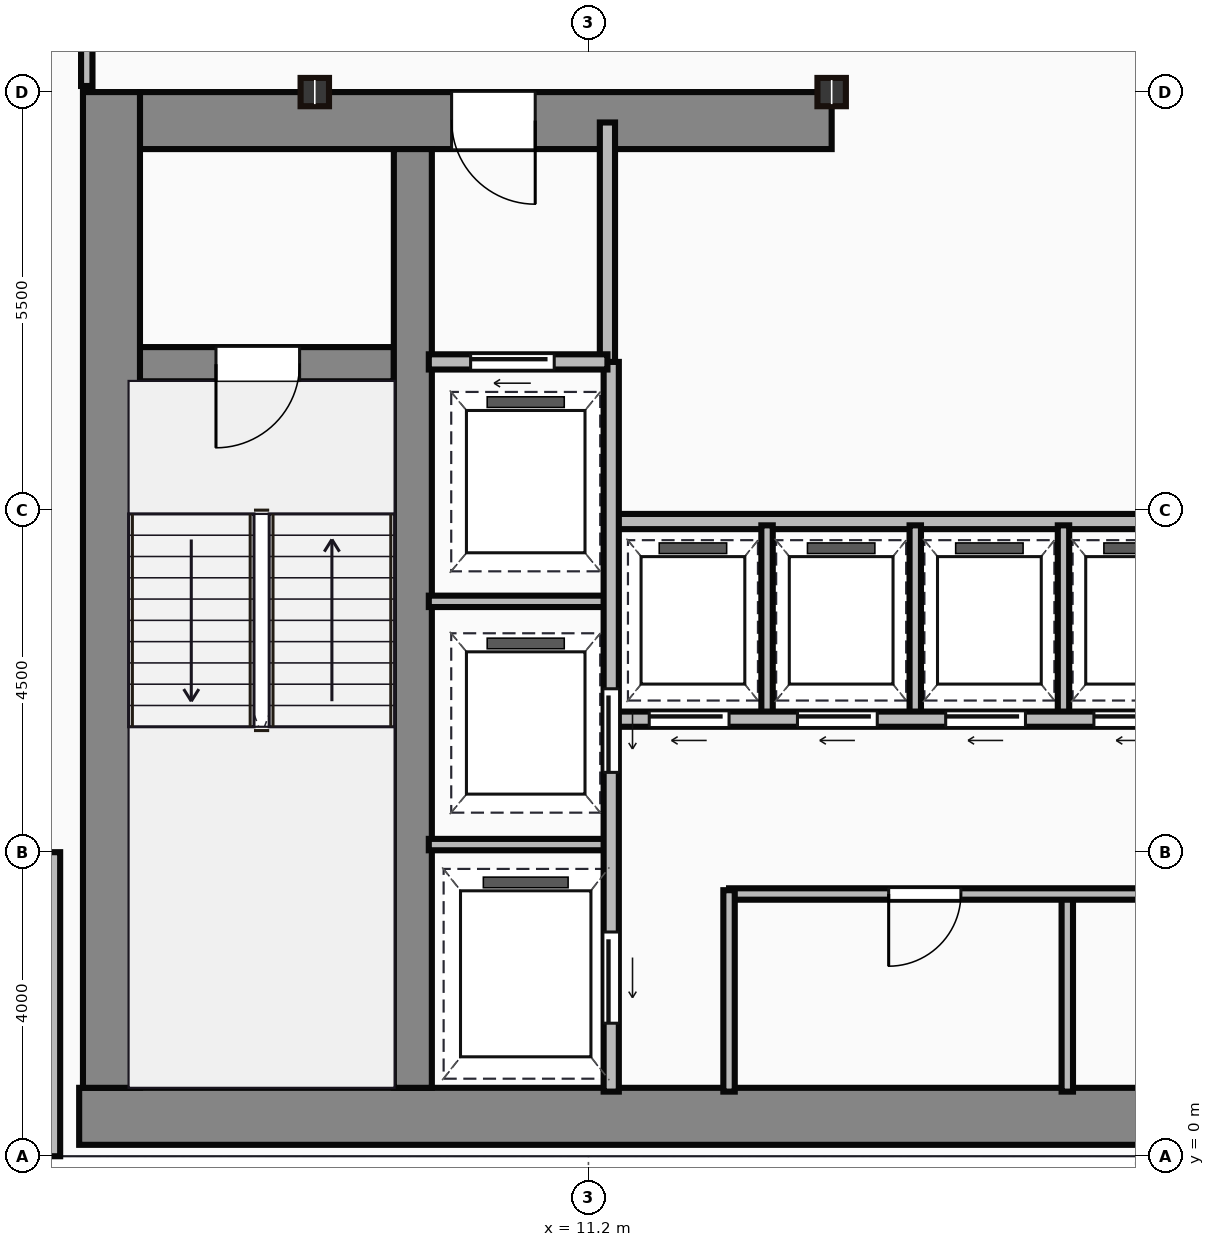
"""IFC4 building model, lengths in metres.
Left out: names, types, materials, properties, quantities, classifications, styles, units other than length and angle.
Written with IfcOpenShell. Run it as: python <this file> out.ifc"""

import sys

from ifc_helpers import new_model, si_unit, direction, frame, frame_2d, origin, origin_2d, place, context, subcontext, project, spatial, rectangle, i_section, extrude, source, transform, mapped, element, fill, save


model = new_model("IFC4")
c1 = context("Model", 3, precision=1e-05, world=origin(), true_north=direction((0.0, 1.0)))
c2 = subcontext(c1, "Body", "Model", "MODEL_VIEW")
j1 = project(units=[si_unit("LENGTHUNIT", "METRE"), si_unit("PLANEANGLEUNIT", "RADIAN")], contexts=[c1])
p1 = place(None, origin())
s1 = spatial("IfcSite", under=j1, at=p1, CompositionType="ELEMENT")
p2 = place(p1, origin())
s2 = spatial("IfcBuilding", under=s1, at=p2, CompositionType="ELEMENT")
p3 = place(p2, frame((0.0, 0.0, 158.85)))
s3 = spatial("IfcBuildingStorey", under=s2, at=p3, CompositionType="ELEMENT", Elevation=158.85)
m1 = source(origin(), c2, "Body", "SweptSolid", [
    extrude(rectangle(XDim=29.5, YDim=0.75, at=frame_2d((14.75, 0.0))), origin(), (0.0, 0.0, 1.0), 3.65),
])
p4 = place(p3, frame((4.5, 0.525, 0.0), z_axis=(0.0, 0.0, 1.0), x_axis=(1.0, 0.0, 0.0)))
e1 = element("IfcWall", 1, at=p4, inside=s3, PredefinedType="SHEAR", context=c2, shape_type="MappedRepresentation", body=[
    mapped(m1, transform((0.0, 0.0, 0.0))),
])
m2 = source(origin(), c2, "Body", "SweptSolid", [
    extrude(rectangle(XDim=13.1, YDim=0.75, at=frame_2d((6.55, 0.0))), origin(), (0.0, 0.0, 1.0), 3.65),
])
p5 = place(p3, frame((4.925, 0.9, 0.0), z_axis=(0.0, 0.0, 1.0), x_axis=(0.0, 1.0, 0.0)))
e2 = element("IfcWall", 2, at=p5, inside=s3, PredefinedType="SHEAR", context=c2, shape_type="MappedRepresentation", body=[
    mapped(m2, transform((0.0, 0.0, 0.0))),
])
m3 = source(origin(), c2, "Body", "SweptSolid", [
    extrude(rectangle(XDim=9.1, YDim=0.75, at=frame_2d((4.55, 0.0))), origin(), (0.0, 0.0, 1.0), 3.65),
])
p6 = place(p3, frame((5.3, 13.625, 0.0), z_axis=(0.0, 0.0, 1.0), x_axis=(1.0, 0.0, 0.0)))
e3 = element("IfcWall", 3, at=p6, inside=s3, PredefinedType="SHEAR", context=c2, shape_type="MappedRepresentation", body=[
    mapped(m3, transform((0.0, 0.0, 0.0))),
])
p7 = place(p6, frame((4.1, 0.0, 0.0)))
e4 = element("IfcOpeningElement", 4, at=p7, cuts=e3, PredefinedType="OPENING", context=c2, shape_type="SweptSolid", body=[
    extrude(rectangle(XDim=1.1, YDim=2.15, at=frame_2d((0.55, 1.075))), frame((0.0, 0.385, 0.0), z_axis=(0.0, -1.0, 0.0), x_axis=(1.0, 0.0, 0.0)), (0.0, 0.0, 1.0), 0.77),
])
m4 = source(origin(), c2, "Body", "SweptSolid", [
    extrude(rectangle(XDim=12.35, YDim=0.5, at=frame_2d((6.175, 0.0))), origin(), (0.0, 0.0, 1.0), 3.65),
])
p8 = place(p3, frame((8.89, 0.9, 0.0), z_axis=(0.0, 0.0, 1.0), x_axis=(0.0, 1.0, 0.0)))
e5 = element("IfcWall", 5, at=p8, inside=s3, PredefinedType="SHEAR", context=c2, shape_type="MappedRepresentation", body=[
    mapped(m4, transform((0.0, 0.0, 0.0))),
])
m5 = source(origin(), c2, "Body", "SweptSolid", [
    extrude(rectangle(XDim=3.39, YDim=0.45, at=frame_2d((1.695, 0.0))), origin(), (0.0, 0.0, 1.0), 3.65),
])
p9 = place(p3, frame((5.25, 10.42, 0.0), z_axis=(0.0, 0.0, 1.0), x_axis=(1.0, 0.0, 0.0)))
e6 = element("IfcWall", 6, at=p9, inside=s3, PredefinedType="SHEAR", context=c2, shape_type="MappedRepresentation", body=[
    mapped(m5, transform((0.0, 0.0, 0.0))),
])
p10 = place(p9, frame((1.05, 0.0, 0.0)))
e7 = element("IfcOpeningElement", 7, at=p10, cuts=e6, PredefinedType="OPENING", context=c2, shape_type="SweptSolid", body=[
    extrude(rectangle(XDim=1.1, YDim=2.15, at=frame_2d((0.55, 1.075))), frame((0.0, 0.235, 0.0), z_axis=(0.0, -1.0, 0.0), x_axis=(1.0, 0.0, 0.0)), (0.0, 0.0, 1.0), 0.47),
])
m6 = source(origin(), c2, "Body", "SweptSolid", [
    extrude(i_section(OverallWidth=0.374, OverallDepth=0.372, WebThickness=0.016, FlangeThickness=0.026, at=origin_2d()), origin(), (0.0, 0.0, 1.0), 3.65),
])
for number, where, z_axis, x_axis in (
    (8, (7.6, 14.0, 0.0), (0.0, 0.0, 1.0), (1.0, 0.0, 0.0)),
    (9, (14.4, 14.0, 0.0), (0.0, 0.0, 1.0), (1.0, 0.0, 0.0)),
):
    element("IfcColumn", number, at=place(p3, frame(where, z_axis=z_axis, x_axis=x_axis)), inside=s3, PredefinedType="COLUMN", context=c2, shape_type="MappedRepresentation", body=[
        mapped(m6, transform((0.0, 0.0, 0.0))),
    ])
m7 = source(origin(), c2, "Body", "SweptSolid", [
    extrude(rectangle(XDim=4.0, YDim=0.25, at=frame_2d((2.0, 0.0))), origin(), (0.0, 0.0, 1.0), 3.4),
])
p11 = place(p3, frame((4.125, 4.0, 0.0), z_axis=(0.0, 0.0, 1.0), x_axis=(0.0, -1.0, 0.0)))
e10 = element("IfcWall", 10, at=p11, inside=s3, PredefinedType="STANDARD", context=c2, shape_type="MappedRepresentation", body=[
    mapped(m7, transform((0.0, 0.0, 0.0))),
])
m8 = source(origin(), c2, "Body", "SweptSolid", [
    extrude(rectangle(XDim=3.18, YDim=0.2, at=frame_2d((1.59, 0.0))), origin(), (0.0, 0.0, 1.0), 3.4),
])
p12 = place(p3, frame((11.45, 10.42, 0.0), z_axis=(0.0, 0.0, 1.0), x_axis=(0.0, 1.0, 0.0)))
e11 = element("IfcWall", 11, at=p12, inside=s3, PredefinedType="PARTITIONING", context=c2, shape_type="MappedRepresentation", body=[
    mapped(m8, transform((0.0, 0.0, 0.0))),
])
m9 = source(origin(), c2, "Body", "SweptSolid", [
    extrude(rectangle(XDim=2.35, YDim=0.2, at=frame_2d((1.175, 0.0))), origin(), (0.0, 0.0, 1.0), 3.4),
])
p13 = place(p3, frame((9.1, 10.45, 0.0), z_axis=(0.0, 0.0, 1.0), x_axis=(1.0, 0.0, 0.0)))
e12 = element("IfcWall", 12, at=p13, inside=s3, PredefinedType="PARTITIONING", context=c2, shape_type="MappedRepresentation", body=[
    mapped(m9, transform((0.0, 0.0, 0.0))),
])
p14 = place(p13, frame((0.55, 0.0, 0.0)))
e13 = element("IfcOpeningElement", 13, at=p14, cuts=e12, PredefinedType="OPENING", context=c2, shape_type="SweptSolid", body=[
    extrude(rectangle(XDim=1.1, YDim=2.15, at=frame_2d((0.55, 1.075))), frame((0.0, 0.11, 0.0), z_axis=(0.0, -1.0, 0.0), x_axis=(1.0, 0.0, 0.0)), (0.0, 0.0, 1.0), 0.22),
])
m10 = source(origin(), c2, "Body", "SweptSolid", [
    extrude(rectangle(XDim=9.6, YDim=0.2, at=frame_2d((4.8, 0.0))), origin(), (0.0, 0.0, 1.0), 3.4),
])
p15 = place(p3, frame((11.5, 0.85, 0.0), z_axis=(0.0, 0.0, 1.0), x_axis=(0.0, 1.0, 0.0)))
e14 = element("IfcWall", 14, at=p15, inside=s3, PredefinedType="PARTITIONING", context=c2, shape_type="MappedRepresentation", body=[
    mapped(m10, transform((0.0, 0.0, 0.0))),
])
p16 = place(p15, frame((4.2, 0.0, 0.0)))
e15 = element("IfcOpeningElement", 15, at=p16, cuts=e14, PredefinedType="OPENING", context=c2, shape_type="SweptSolid", body=[
    extrude(rectangle(XDim=1.1, YDim=2.15, at=frame_2d((0.55, 1.075))), frame((0.0, 0.11, 0.0), z_axis=(0.0, -1.0, 0.0), x_axis=(1.0, 0.0, 0.0)), (0.0, 0.0, 1.0), 0.22),
])
p17 = place(p15, frame((0.9, 0.0, 0.0)))
e16 = element("IfcOpeningElement", 16, at=p17, cuts=e14, PredefinedType="OPENING", context=c2, shape_type="SweptSolid", body=[
    extrude(rectangle(XDim=1.2, YDim=2.15, at=frame_2d((0.6, 1.075))), frame((0.0, 0.11, 0.0), z_axis=(0.0, -1.0, 0.0), x_axis=(1.0, 0.0, 0.0)), (0.0, 0.0, 1.0), 0.22),
])
m11 = source(origin(), c2, "Body", "SweptSolid", [
    extrude(rectangle(XDim=2.4, YDim=0.15, at=frame_2d((1.2, 0.0))), origin(), (0.0, 0.0, 1.0), 3.4),
])
for number, where, z_axis, x_axis in (
    (17, (9.1, 4.1, 0.0), (0.0, 0.0, 1.0), (1.0, 0.0, 0.0)),
    (18, (9.1, 7.3, 0.0), (0.0, 0.0, 1.0), (1.0, 0.0, 0.0)),
):
    element("IfcWall", number, at=place(p3, frame(where, z_axis=z_axis, x_axis=x_axis)), inside=s3, PredefinedType="PARTITIONING", context=c2, shape_type="MappedRepresentation", body=[
        mapped(m11, transform((0.0, 0.0, 0.0))),
    ])
m12 = source(origin(), c2, "Body", "SweptSolid", [
    extrude(rectangle(XDim=2.65, YDim=0.15, at=frame_2d((1.325, 0.0))), origin(), (0.0, 0.0, 1.0), 3.4),
])
p18 = place(p3, frame((13.05, 0.85, 0.0), z_axis=(0.0, 0.0, 1.0), x_axis=(0.0, 1.0, 0.0)))
e19 = element("IfcWall", 19, at=p18, inside=s3, PredefinedType="PARTITIONING", context=c2, shape_type="MappedRepresentation", body=[
    mapped(m12, transform((0.0, 0.0, 0.0))),
])
m13 = source(origin(), c2, "Body", "SweptSolid", [
    extrude(rectangle(XDim=10.35, YDim=0.15, at=frame_2d((5.175, 0.0))), origin(), (0.0, 0.0, 1.0), 3.4),
])
p19 = place(p3, frame((13.05, 3.45, 0.0), z_axis=(0.0, 0.0, 1.0), x_axis=(1.0, 0.0, 0.0)))
e20 = element("IfcWall", 20, at=p19, inside=s3, PredefinedType="PARTITIONING", context=c2, shape_type="MappedRepresentation", body=[
    mapped(m13, transform((0.0, 0.0, 0.0))),
])
p20 = place(p19, frame((2.1, 0.0, 0.0)))
e21 = element("IfcOpeningElement", 21, at=p20, cuts=e20, PredefinedType="OPENING", context=c2, shape_type="SweptSolid", body=[
    extrude(rectangle(XDim=0.95, YDim=2.15, at=frame_2d((0.475, 1.075))), frame((0.0, 0.085, 0.0), z_axis=(0.0, -1.0, 0.0), x_axis=(1.0, 0.0, 0.0)), (0.0, 0.0, 1.0), 0.17),
])
p21 = place(p19, frame((6.8, 0.0, 0.0)))
e22 = element("IfcOpeningElement", 22, at=p21, cuts=e20, PredefinedType="OPENING", context=c2, shape_type="SweptSolid", body=[
    extrude(rectangle(XDim=0.95, YDim=2.15, at=frame_2d((0.475, 1.075))), frame((0.0, 0.085, 0.0), z_axis=(0.0, -1.0, 0.0), x_axis=(1.0, 0.0, 0.0)), (0.0, 0.0, 1.0), 0.17),
])
m14 = source(origin(), c2, "Body", "SweptSolid", [
    extrude(rectangle(XDim=2.6, YDim=0.15, at=frame_2d((1.3, 0.0))), origin(), (0.0, 0.0, 1.0), 3.4),
])
p22 = place(p3, frame((17.5, 0.85, 0.0), z_axis=(0.0, 0.0, 1.0), x_axis=(0.0, 1.0, 0.0)))
e23 = element("IfcWall", 23, at=p22, inside=s3, PredefinedType="PARTITIONING", context=c2, shape_type="MappedRepresentation", body=[
    mapped(m14, transform((0.0, 0.0, 0.0))),
])
m15 = source(origin(), c2, "Body", "SweptSolid", [
    extrude(rectangle(XDim=11.85, YDim=0.2, at=frame_2d((5.925, 0.0))), origin(), (0.0, 0.0, 1.0), 3.4),
])
p23 = place(p3, frame((11.55, 5.75, 0.0), z_axis=(0.0, 0.0, 1.0), x_axis=(1.0, 0.0, 0.0)))
e24 = element("IfcWall", 24, at=p23, inside=s3, PredefinedType="PARTITIONING", context=c2, shape_type="MappedRepresentation", body=[
    mapped(m15, transform((0.0, 0.0, 0.0))),
])
p24 = place(p23, frame((0.45, 0.0, 0.0)))
e25 = element("IfcOpeningElement", 25, at=p24, cuts=e24, PredefinedType="OPENING", context=c2, shape_type="SweptSolid", body=[
    extrude(rectangle(XDim=1.05, YDim=2.15, at=frame_2d((0.525, 1.075))), frame((0.0, 0.11, 0.0), z_axis=(0.0, -1.0, 0.0), x_axis=(1.0, 0.0, 0.0)), (0.0, 0.0, 1.0), 0.22),
])
p25 = place(p23, frame((2.4, 0.0, 0.0)))
e26 = element("IfcOpeningElement", 26, at=p25, cuts=e24, PredefinedType="OPENING", context=c2, shape_type="SweptSolid", body=[
    extrude(rectangle(XDim=1.05, YDim=2.15, at=frame_2d((0.525, 1.075))), frame((0.0, 0.11, 0.0), z_axis=(0.0, -1.0, 0.0), x_axis=(1.0, 0.0, 0.0)), (0.0, 0.0, 1.0), 0.22),
])
p26 = place(p23, frame((4.35, 0.0, 0.0)))
e27 = element("IfcOpeningElement", 27, at=p26, cuts=e24, PredefinedType="OPENING", context=c2, shape_type="SweptSolid", body=[
    extrude(rectangle(XDim=1.05, YDim=2.15, at=frame_2d((0.525, 1.075))), frame((0.0, 0.11, 0.0), z_axis=(0.0, -1.0, 0.0), x_axis=(1.0, 0.0, 0.0)), (0.0, 0.0, 1.0), 0.22),
])
p27 = place(p23, frame((6.3, 0.0, 0.0)))
e28 = element("IfcOpeningElement", 28, at=p27, cuts=e24, PredefinedType="OPENING", context=c2, shape_type="SweptSolid", body=[
    extrude(rectangle(XDim=1.05, YDim=2.15, at=frame_2d((0.525, 1.075))), frame((0.0, 0.11, 0.0), z_axis=(0.0, -1.0, 0.0), x_axis=(1.0, 0.0, 0.0)), (0.0, 0.0, 1.0), 0.22),
])
p28 = place(p23, frame((8.25, 0.0, 0.0)))
e29 = element("IfcOpeningElement", 29, at=p28, cuts=e24, PredefinedType="OPENING", context=c2, shape_type="SweptSolid", body=[
    extrude(rectangle(XDim=1.05, YDim=2.15, at=frame_2d((0.525, 1.075))), frame((0.0, 0.11, 0.0), z_axis=(0.0, -1.0, 0.0), x_axis=(1.0, 0.0, 0.0)), (0.0, 0.0, 1.0), 0.22),
])
p29 = place(p23, frame((10.2, 0.0, 0.0)))
e30 = element("IfcOpeningElement", 30, at=p29, cuts=e24, PredefinedType="OPENING", context=c2, shape_type="SweptSolid", body=[
    extrude(rectangle(XDim=1.05, YDim=2.15, at=frame_2d((0.525, 1.075))), frame((0.0, 0.11, 0.0), z_axis=(0.0, -1.0, 0.0), x_axis=(1.0, 0.0, 0.0)), (0.0, 0.0, 1.0), 0.22),
])
p30 = place(p3, frame((11.55, 8.35, 0.0), z_axis=(0.0, 0.0, 1.0), x_axis=(1.0, 0.0, 0.0)))
e31 = element("IfcWall", 31, at=p30, inside=s3, PredefinedType="PARTITIONING", context=c2, shape_type="MappedRepresentation", body=[
    mapped(m15, transform((0.0, 0.0, 0.0))),
])
m16 = source(origin(), c2, "Body", "SweptSolid", [
    extrude(rectangle(XDim=2.5, YDim=0.15, at=frame_2d((1.25, 0.0))), origin(), (0.0, 0.0, 1.0), 3.4),
])
for number, where, z_axis, x_axis in (
    (32, (13.55, 5.8, 0.0), (0.0, 0.0, 1.0), (0.0, 1.0, 0.0)),
    (33, (15.5, 5.8, 0.0), (0.0, 0.0, 1.0), (0.0, 1.0, 0.0)),
    (34, (17.45, 5.8, 0.0), (0.0, 0.0, 1.0), (0.0, 1.0, 0.0)),
):
    element("IfcWall", number, at=place(p3, frame(where, z_axis=z_axis, x_axis=x_axis)), inside=s3, PredefinedType="PARTITIONING", context=c2, shape_type="MappedRepresentation", body=[
        mapped(m16, transform((0.0, 0.0, 0.0))),
    ])
m17 = source(origin(), c2, "Body", "SweptSolid", [
    extrude(rectangle(XDim=2.22, YDim=0.15, at=frame_2d((1.11, 0.0))), origin(), (0.0, 0.0, 1.0), 3.4),
])
p31 = place(p3, frame((4.6, 14.08, 0.0), z_axis=(0.0, 0.0, 1.0), x_axis=(0.0, 1.0, 0.0)))
e35 = element("IfcWall", 35, at=p31, inside=s3, PredefinedType="PARTITIONING", context=c2, shape_type="MappedRepresentation", body=[
    mapped(m17, transform((0.0, 0.0, 0.0))),
])
m18 = source(origin(), c2, "Body", "SweptSolid", [
    extrude(rectangle(XDim=1.1, YDim=2.15, at=frame_2d((0.55, 1.075))), frame((0.0, 0.025, 0.0), z_axis=(0.0, -1.0, 0.0), x_axis=(1.0, 0.0, 0.0)), (0.0, 0.0, 1.0), 0.05),
])
p32 = place(p10, frame((1.1, 0.0, 0.0), z_axis=(0.0, 0.0, 1.0), x_axis=(-1.0, 0.0, 0.0)))
e36 = element("IfcDoor", 36, at=p32, inside=s3, OperationType="SINGLE_SWING_LEFT", PredefinedType="DOOR", context=c2, shape_type="MappedRepresentation", body=[
    mapped(m18, transform((0.0, 0.0, 0.0))),
])
fill(e7, e36)
p33 = place(p7, origin())
e37 = element("IfcDoor", 37, at=p33, inside=s3, OperationType="SINGLE_SWING_RIGHT", PredefinedType="DOOR", context=c2, shape_type="MappedRepresentation", body=[
    mapped(m18, transform((0.0, 0.0, 0.0))),
])
fill(e4, e37)
p34 = place(p14, origin())
e38 = element("IfcDoor", 38, at=p34, inside=s3, OperationType="SLIDING_TO_LEFT", PredefinedType="DOOR", context=c2, shape_type="MappedRepresentation", body=[
    mapped(m18, transform((0.0, 0.0, 0.0))),
])
fill(e13, e38)
p35 = place(p16, frame((1.1, 0.0, 0.0), z_axis=(0.0, 0.0, 1.0), x_axis=(-1.0, 0.0, 0.0)))
e39 = element("IfcDoor", 39, at=p35, inside=s3, OperationType="SLIDING_TO_LEFT", PredefinedType="DOOR", context=c2, shape_type="MappedRepresentation", body=[
    mapped(m18, transform((0.0, 0.0, 0.0))),
])
fill(e15, e39)
m19 = source(origin(), c2, "Body", "SweptSolid", [
    extrude(rectangle(XDim=1.2, YDim=2.15, at=frame_2d((0.6, 1.075))), frame((0.0, 0.025, 0.0), z_axis=(0.0, -1.0, 0.0), x_axis=(1.0, 0.0, 0.0)), (0.0, 0.0, 1.0), 0.05),
])
p36 = place(p17, frame((1.2, 0.0, 0.0), z_axis=(0.0, 0.0, 1.0), x_axis=(-1.0, 0.0, 0.0)))
e40 = element("IfcDoor", 40, at=p36, inside=s3, OperationType="SLIDING_TO_LEFT", PredefinedType="DOOR", context=c2, shape_type="MappedRepresentation", body=[
    mapped(m19, transform((0.0, 0.0, 0.0))),
])
fill(e16, e40)
m20 = source(origin(), c2, "Body", "SweptSolid", [
    extrude(rectangle(XDim=0.95, YDim=2.15, at=frame_2d((0.475, 1.075))), frame((0.0, 0.025, 0.0), z_axis=(0.0, -1.0, 0.0), x_axis=(1.0, 0.0, 0.0)), (0.0, 0.0, 1.0), 0.05),
])
p37 = place(p20, origin())
e41 = element("IfcDoor", 41, at=p37, inside=s3, OperationType="SINGLE_SWING_LEFT", PredefinedType="DOOR", context=c2, shape_type="MappedRepresentation", body=[
    mapped(m20, transform((0.0, 0.0, 0.0))),
])
fill(e21, e41)
m21 = source(origin(), c2, "Body", "SweptSolid", [
    extrude(rectangle(XDim=1.05, YDim=2.15, at=frame_2d((0.525, 1.075))), frame((0.0, 0.025, 0.0), z_axis=(0.0, -1.0, 0.0), x_axis=(1.0, 0.0, 0.0)), (0.0, 0.0, 1.0), 0.05),
])
p38 = place(p24, frame((1.05, 0.0, 0.0), z_axis=(0.0, 0.0, 1.0), x_axis=(-1.0, 0.0, 0.0)))
e42 = element("IfcDoor", 42, at=p38, inside=s3, OperationType="SLIDING_TO_LEFT", PredefinedType="DOOR", context=c2, shape_type="MappedRepresentation", body=[
    mapped(m21, transform((0.0, 0.0, 0.0))),
])
fill(e25, e42)
p39 = place(p25, frame((1.05, 0.0, 0.0), z_axis=(0.0, 0.0, 1.0), x_axis=(-1.0, 0.0, 0.0)))
e43 = element("IfcDoor", 43, at=p39, inside=s3, OperationType="SLIDING_TO_LEFT", PredefinedType="DOOR", context=c2, shape_type="MappedRepresentation", body=[
    mapped(m21, transform((0.0, 0.0, 0.0))),
])
fill(e26, e43)
p40 = place(p26, frame((1.05, 0.0, 0.0), z_axis=(0.0, 0.0, 1.0), x_axis=(-1.0, 0.0, 0.0)))
e44 = element("IfcDoor", 44, at=p40, inside=s3, OperationType="SLIDING_TO_LEFT", PredefinedType="DOOR", context=c2, shape_type="MappedRepresentation", body=[
    mapped(m21, transform((0.0, 0.0, 0.0))),
])
fill(e27, e44)
p41 = place(p27, frame((1.05, 0.0, 0.0), z_axis=(0.0, 0.0, 1.0), x_axis=(-1.0, 0.0, 0.0)))
e45 = element("IfcDoor", 45, at=p41, inside=s3, OperationType="SLIDING_TO_LEFT", PredefinedType="DOOR", context=c2, shape_type="MappedRepresentation", body=[
    mapped(m21, transform((0.0, 0.0, 0.0))),
])
fill(e28, e45)
save(model, sys.argv[1])
